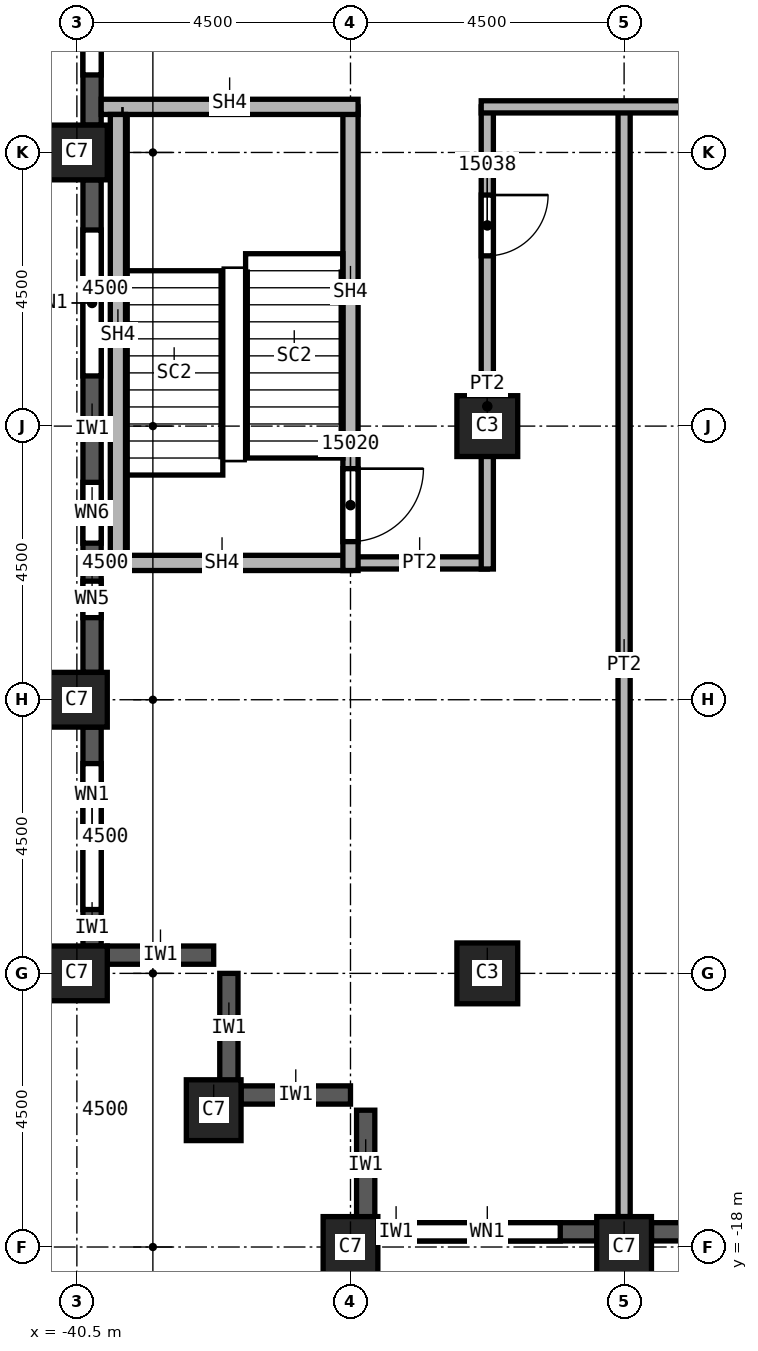
"""IFC4 building model, lengths in metres.
Left out: names, types, materials, properties, quantities, classifications, styles, units other than length and angle.
Written with IfcOpenShell. Run it as: python <this file> out.ifc"""

import sys

from ifc_helpers import new_model, si_unit, direction, frame, frame_2d, origin, origin_2d, place, context, subcontext, project, spatial, rectangle, extrude, element, fill, save


model = new_model("IFC4")
c1 = context("Model", 3, precision=1e-05, world=origin(), true_north=direction((0.0, 1.0)))
c2 = subcontext(c1, "Body", "Model", "MODEL_VIEW")
j1 = project(units=[si_unit("LENGTHUNIT", "METRE"), si_unit("PLANEANGLEUNIT", "RADIAN")], contexts=[c1])
p1 = place(None, origin())
s1 = spatial("IfcSite", under=j1, at=p1, CompositionType="ELEMENT")
p2 = place(p1, origin())
s2 = spatial("IfcBuilding", under=s1, at=p2, CompositionType="ELEMENT")
p3 = place(p2, frame((0.0, 0.0, 232.0)))
s3 = spatial("IfcBuildingStorey", under=s2, at=p3, CompositionType="ELEMENT", Elevation=232.0)
for number, where, z_axis, x_axis in (
    (1, (-40.5, 0.0, 0.0), (0.0, 0.0, 1.0), (0.0, 1.0, 0.0)),
    (2, (-40.5, -9.0, 0.0), (0.0, 0.0, 1.0), (0.0, 1.0, 0.0)),
    (3, (-40.5, -13.5, 0.0), (0.0, 0.0, 1.0), (0.0, 1.0, 0.0)),
    (4, (-38.25, -15.75, 0.0), (0.0, 0.0, 1.0), (1.0, 0.0, 0.0)),
    (5, (-31.5, -18.0, 0.0), (0.0, 0.0, 1.0), (1.0, 0.0, 0.0)),
    (6, (-36.0, -18.0, 0.0), (0.0, 0.0, 1.0), (1.0, 0.0, 0.0)),
):
    element("IfcColumn", number, at=place(p3, frame(where, z_axis=z_axis, x_axis=x_axis)), inside=s3, PredefinedType="COLUMN", context=c2, shape_type="SweptSolid", body=[
        extrude(rectangle(XDim=0.9, YDim=1.0, at=origin_2d()), origin(), (0.0, 0.0, 1.0), 3.6),
    ])
for number, where, z_axis, x_axis in (
    (7, (-33.75, -4.5, 0.0), (0.0, 0.0, 1.0), (1.0, 0.0, 0.0)),
    (8, (-33.75, -13.5, 0.0), (0.0, 0.0, 1.0), (1.0, 0.0, 0.0)),
):
    element("IfcColumn", number, at=place(p3, frame(where, z_axis=z_axis, x_axis=x_axis)), inside=s3, PredefinedType="COLUMN", context=c2, shape_type="SweptSolid", body=[
        extrude(rectangle(XDim=1.0, YDim=1.0, at=origin_2d()), origin(), (0.0, 0.0, 1.0), 3.6),
    ])
p4 = place(p3, frame((-40.0, -13.2, 0.0), z_axis=(0.0, 0.0, 1.0), x_axis=(1.0, 0.0, 0.0)))
e9 = element("IfcWall", 9, at=p4, inside=s3, PredefinedType="SOLIDWALL", context=c2, shape_type="SweptSolid", body=[
    extrude(rectangle(XDim=1.75, YDim=0.3, at=frame_2d((0.875, 0.0))), origin(), (0.0, 0.0, 1.0), 3.0),
])
for number, where, z_axis, x_axis in (
    (10, (-38.0, -15.3, 0.0), (0.0, 0.0, 1.0), (0.0, 1.0, 0.0)),
    (11, (-37.8, -15.5, 0.0), (0.0, 0.0, 1.0), (1.0, 0.0, 0.0)),
    (12, (-35.75, -17.55, 0.0), (0.0, 0.0, 1.0), (0.0, 1.0, 0.0)),
):
    element("IfcWall", number, at=place(p3, frame(where, z_axis=z_axis, x_axis=x_axis)), inside=s3, PredefinedType="SOLIDWALL", context=c2, shape_type="SweptSolid", body=[
        extrude(rectangle(XDim=1.8, YDim=0.3, at=frame_2d((0.9, 0.0))), origin(), (0.0, 0.0, 1.0), 3.0),
    ])
p5 = place(p3, frame((-40.25, 8.55, 0.0), z_axis=(0.0, 0.0, 1.0), x_axis=(0.0, -1.0, 0.0)))
e13 = element("IfcWall", 13, at=p5, inside=s3, PredefinedType="SOLIDWALL", context=c2, shape_type="SweptSolid", body=[
    extrude(rectangle(XDim=8.1, YDim=0.3, at=frame_2d((4.05, 0.0))), origin(), (0.0, 0.0, 1.0), 3.0),
])
p6 = place(p5, frame((0.825, 0.0, 0.8)))
e14 = element("IfcOpeningElement", 14, at=p6, cuts=e13, PredefinedType="OPENING", context=c2, shape_type="SweptSolid", body=[
    extrude(rectangle(XDim=2.4, YDim=1.95, at=frame_2d((1.2, 0.975))), frame((0.0, 0.15, 0.0), z_axis=(0.0, -1.0, 0.0), x_axis=(1.0, 0.0, 0.0)), (0.0, 0.0, 1.0), 0.3),
])
p7 = place(p5, frame((4.875, 0.0, 0.8)))
e15 = element("IfcOpeningElement", 15, at=p7, cuts=e13, PredefinedType="OPENING", context=c2, shape_type="SweptSolid", body=[
    extrude(rectangle(XDim=2.4, YDim=1.95, at=frame_2d((1.2, 0.975))), frame((0.0, 0.15, 0.0), z_axis=(0.0, -1.0, 0.0), x_axis=(1.0, 0.0, 0.0)), (0.0, 0.0, 1.0), 0.3),
])
p8 = place(p3, frame((-40.25, -0.45, 0.0), z_axis=(0.0, 0.0, 1.0), x_axis=(0.0, -1.0, 0.0)))
e16 = element("IfcWall", 16, at=p8, inside=s3, PredefinedType="SOLIDWALL", context=c2, shape_type="SweptSolid", body=[
    extrude(rectangle(XDim=8.1, YDim=0.3, at=frame_2d((4.05, 0.0))), origin(), (0.0, 0.0, 1.0), 3.0),
])
p9 = place(p8, frame((0.825, 0.0, 0.8)))
e17 = element("IfcOpeningElement", 17, at=p9, cuts=e16, PredefinedType="OPENING", context=c2, shape_type="SweptSolid", body=[
    extrude(rectangle(XDim=2.4, YDim=1.95, at=frame_2d((1.2, 0.975))), frame((0.0, 0.15, 0.0), z_axis=(0.0, -1.0, 0.0), x_axis=(1.0, 0.0, 0.0)), (0.0, 0.0, 1.0), 0.3),
])
p10 = place(p8, frame((4.975, 0.0, 0.8)))
e18 = element("IfcOpeningElement", 18, at=p10, cuts=e16, PredefinedType="OPENING", context=c2, shape_type="SweptSolid", body=[
    extrude(rectangle(XDim=1.0, YDim=1.95, at=frame_2d((0.5, 0.975))), frame((0.0, 0.15, 0.0), z_axis=(0.0, -1.0, 0.0), x_axis=(1.0, 0.0, 0.0)), (0.0, 0.0, 1.0), 0.3),
])
p11 = place(p8, frame((6.6, 0.0, 0.8)))
e19 = element("IfcOpeningElement", 19, at=p11, cuts=e16, PredefinedType="OPENING", context=c2, shape_type="SweptSolid", body=[
    extrude(rectangle(XDim=0.6, YDim=1.95, at=frame_2d((0.3, 0.975))), frame((0.0, 0.15, 0.0), z_axis=(0.0, -1.0, 0.0), x_axis=(1.0, 0.0, 0.0)), (0.0, 0.0, 1.0), 0.3),
])
p12 = place(p3, frame((-40.25, -9.45, 0.0), z_axis=(0.0, 0.0, 1.0), x_axis=(0.0, -1.0, 0.0)))
e20 = element("IfcWall", 20, at=p12, inside=s3, PredefinedType="SOLIDWALL", context=c2, shape_type="SweptSolid", body=[
    extrude(rectangle(XDim=3.6, YDim=0.3, at=frame_2d((1.8, 0.0))), origin(), (0.0, 0.0, 1.0), 3.0),
])
p13 = place(p12, frame((0.6, 0.0, 0.8)))
e21 = element("IfcOpeningElement", 21, at=p13, cuts=e20, PredefinedType="OPENING", context=c2, shape_type="SweptSolid", body=[
    extrude(rectangle(XDim=2.4, YDim=1.95, at=frame_2d((1.2, 0.975))), frame((0.0, 0.15, 0.0), z_axis=(0.0, -1.0, 0.0), x_axis=(1.0, 0.0, 0.0)), (0.0, 0.0, 1.0), 0.3),
])
p14 = place(p3, frame((-35.55, -17.75, 0.0), z_axis=(0.0, 0.0, 1.0), x_axis=(1.0, 0.0, 0.0)))
e22 = element("IfcWall", 22, at=p14, inside=s3, PredefinedType="SOLIDWALL", context=c2, shape_type="SweptSolid", body=[
    extrude(rectangle(XDim=3.6, YDim=0.3, at=frame_2d((1.8, 0.0))), origin(), (0.0, 0.0, 1.0), 3.0),
])
p15 = place(p14, frame((0.6, 0.0, 0.8)))
e23 = element("IfcOpeningElement", 23, at=p15, cuts=e22, PredefinedType="OPENING", context=c2, shape_type="SweptSolid", body=[
    extrude(rectangle(XDim=2.4, YDim=1.95, at=frame_2d((1.2, 0.975))), frame((0.0, 0.15, 0.0), z_axis=(0.0, -1.0, 0.0), x_axis=(1.0, 0.0, 0.0)), (0.0, 0.0, 1.0), 0.3),
])
p16 = place(p3, frame((-31.05, -17.75, 0.0), z_axis=(0.0, 0.0, 1.0), x_axis=(1.0, 0.0, 0.0)))
e24 = element("IfcWall", 24, at=p16, inside=s3, PredefinedType="SOLIDWALL", context=c2, shape_type="SweptSolid", body=[
    extrude(rectangle(XDim=3.6, YDim=0.3, at=frame_2d((1.8, 0.0))), origin(), (0.0, 0.0, 1.0), 3.0),
])
p17 = place(p16, frame((0.6, 0.0, 0.8)))
e25 = element("IfcOpeningElement", 25, at=p17, cuts=e24, PredefinedType="OPENING", context=c2, shape_type="SweptSolid", body=[
    extrude(rectangle(XDim=2.4, YDim=1.95, at=frame_2d((1.2, 0.975))), frame((0.0, 0.15, 0.0), z_axis=(0.0, -1.0, 0.0), x_axis=(1.0, 0.0, 0.0)), (0.0, 0.0, 1.0), 0.3),
])
p18 = place(p3, frame((-33.75, -6.75, 0.0), z_axis=(0.0, 0.0, 1.0), x_axis=(-1.0, 0.0, 0.0)))
e26 = element("IfcWall", 26, at=p18, inside=s3, PredefinedType="PARTITIONING", context=c2, shape_type="SweptSolid", body=[
    extrude(rectangle(XDim=2.25, YDim=0.2, at=frame_2d((1.125, 0.0))), origin(), (0.0, 0.0, 1.0), 3.6),
])
p19 = place(p3, frame((-33.75, 0.75, 0.0), z_axis=(0.0, 0.0, 1.0), x_axis=(0.0, -1.0, 0.0)))
e27 = element("IfcWall", 27, at=p19, inside=s3, PredefinedType="PARTITIONING", context=c2, shape_type="SweptSolid", body=[
    extrude(rectangle(XDim=7.6, YDim=0.2, at=frame_2d((3.8, 0.0))), origin(), (0.0, 0.0, 1.0), 3.6),
])
p20 = place(p19, frame((1.45, 0.0, 0.0)))
e28 = element("IfcOpeningElement", 28, at=p20, cuts=e27, PredefinedType="OPENING", context=c2, shape_type="SweptSolid", body=[
    extrude(rectangle(XDim=1.0, YDim=2.1, at=frame_2d((0.5, 1.05))), frame((0.0, 0.1, 0.0), z_axis=(0.0, -1.0, 0.0), x_axis=(1.0, 0.0, 0.0)), (0.0, 0.0, 1.0), 0.2),
])
p21 = place(p3, frame((-31.5, 0.75, 0.0), z_axis=(0.0, 0.0, 1.0), x_axis=(0.0, -1.0, 0.0)))
e29 = element("IfcWall", 29, at=p21, inside=s3, PredefinedType="PARTITIONING", context=c2, shape_type="SweptSolid", body=[
    extrude(rectangle(XDim=18.25, YDim=0.2, at=frame_2d((9.125, 0.0))), origin(), (0.0, 0.0, 1.0), 3.6),
])
p22 = place(p3, frame((-15.4, 0.75, 0.0), z_axis=(0.0, 0.0, 1.0), x_axis=(-1.0, 0.0, 0.0)))
e30 = element("IfcWall", 30, at=p22, inside=s3, PredefinedType="PARTITIONING", context=c2, shape_type="SweptSolid", body=[
    extrude(rectangle(XDim=18.45, YDim=0.2, at=frame_2d((9.225, 0.0))), origin(), (0.0, 0.0, 1.0), 3.6),
])
p23 = place(p22, frame((5.35, 0.0, 0.0)))
e31 = element("IfcOpeningElement", 31, at=p23, cuts=e30, PredefinedType="OPENING", context=c2, shape_type="SweptSolid", body=[
    extrude(rectangle(XDim=1.0, YDim=2.1, at=frame_2d((0.5, 1.05))), frame((0.0, 0.1, 0.0), z_axis=(0.0, -1.0, 0.0), x_axis=(1.0, 0.0, 0.0)), (0.0, 0.0, 1.0), 0.2),
])
p24 = place(p22, frame((12.35, 0.0, 0.0)))
e32 = element("IfcOpeningElement", 32, at=p24, cuts=e30, PredefinedType="OPENING", context=c2, shape_type="SweptSolid", body=[
    extrude(rectangle(XDim=1.0, YDim=2.1, at=frame_2d((0.5, 1.05))), frame((0.0, 0.1, 0.0), z_axis=(0.0, -1.0, 0.0), x_axis=(1.0, 0.0, 0.0)), (0.0, 0.0, 1.0), 0.2),
])
p25 = place(p3, frame((-36.0, -6.75, 0.0), z_axis=(0.0, 0.0, 1.0), x_axis=(-1.0, 0.0, 0.0)))
e33 = element("IfcWall", 33, at=p25, inside=s3, PredefinedType="SOLIDWALL", context=c2, shape_type="SweptSolid", body=[
    extrude(rectangle(XDim=4.1, YDim=0.25, at=frame_2d((2.05, 0.0))), origin(), (0.0, 0.0, 1.0), 3.6),
])
p26 = place(p3, frame((-36.0, 0.75, 0.0), z_axis=(0.0, 0.0, 1.0), x_axis=(0.0, -1.0, 0.0)))
e34 = element("IfcWall", 34, at=p26, inside=s3, PredefinedType="SOLIDWALL", context=c2, shape_type="SweptSolid", body=[
    extrude(rectangle(XDim=7.625, YDim=0.25, at=frame_2d((3.812, 0.0))), origin(), (0.0, 0.0, 1.0), 3.6),
])
p27 = place(p26, frame((5.95, 0.0, 0.0)))
e35 = element("IfcOpeningElement", 35, at=p27, cuts=e34, PredefinedType="OPENING", context=c2, shape_type="SweptSolid", body=[
    extrude(rectangle(XDim=1.2, YDim=2.1, at=frame_2d((0.6, 1.05))), frame((0.0, 0.125, 0.0), z_axis=(0.0, -1.0, 0.0), x_axis=(1.0, 0.0, 0.0)), (0.0, 0.0, 1.0), 0.25),
])
p28 = place(p3, frame((-35.875, 0.75, 0.0), z_axis=(0.0, 0.0, 1.0), x_axis=(-1.0, 0.0, 0.0)))
e36 = element("IfcWall", 36, at=p28, inside=s3, PredefinedType="SOLIDWALL", context=c2, shape_type="SweptSolid", body=[
    extrude(rectangle(XDim=4.225, YDim=0.25, at=frame_2d((2.113, 0.0))), origin(), (0.0, 0.0, 1.0), 3.6),
])
p29 = place(p3, frame((-39.825, -6.625, 0.0), z_axis=(0.0, 0.0, 1.0), x_axis=(0.0, 1.0, 0.0)))
e37 = element("IfcWall", 37, at=p29, inside=s3, PredefinedType="SOLIDWALL", context=c2, shape_type="SweptSolid", body=[
    extrude(rectangle(XDim=7.25, YDim=0.25, at=frame_2d((3.625, 0.0))), origin(), (0.0, 0.0, 1.0), 3.6),
])
p30 = place(p7, origin())
e38 = element("IfcWindow", 38, at=p30, inside=s3, PartitioningType="SINGLE_PANEL", PredefinedType="WINDOW", context=c2, shape_type="SweptSolid", body=[
    extrude(rectangle(XDim=2.4, YDim=1.95, at=frame_2d((1.2, 0.975))), frame((0.0, 0.03, 0.0), z_axis=(0.0, -1.0, 0.0), x_axis=(1.0, 0.0, 0.0)), (0.0, 0.0, 1.0), 0.06),
])
fill(e15, e38)
p31 = place(p9, origin())
e39 = element("IfcWindow", 39, at=p31, inside=s3, PartitioningType="SINGLE_PANEL", PredefinedType="WINDOW", context=c2, shape_type="SweptSolid", body=[
    extrude(rectangle(XDim=2.4, YDim=1.95, at=frame_2d((1.2, 0.975))), frame((0.0, 0.03, 0.0), z_axis=(0.0, -1.0, 0.0), x_axis=(1.0, 0.0, 0.0)), (0.0, 0.0, 1.0), 0.06),
])
fill(e17, e39)
p32 = place(p13, origin())
e40 = element("IfcWindow", 40, at=p32, inside=s3, PartitioningType="SINGLE_PANEL", PredefinedType="WINDOW", context=c2, shape_type="SweptSolid", body=[
    extrude(rectangle(XDim=2.4, YDim=1.95, at=frame_2d((1.2, 0.975))), frame((0.0, 0.03, 0.0), z_axis=(0.0, -1.0, 0.0), x_axis=(1.0, 0.0, 0.0)), (0.0, 0.0, 1.0), 0.06),
])
fill(e21, e40)
p33 = place(p15, origin())
e41 = element("IfcWindow", 41, at=p33, inside=s3, PartitioningType="SINGLE_PANEL", PredefinedType="WINDOW", context=c2, shape_type="SweptSolid", body=[
    extrude(rectangle(XDim=2.4, YDim=1.95, at=frame_2d((1.2, 0.975))), frame((0.0, 0.03, 0.0), z_axis=(0.0, -1.0, 0.0), x_axis=(1.0, 0.0, 0.0)), (0.0, 0.0, 1.0), 0.06),
])
fill(e23, e41)
p34 = place(p27, origin())
e42 = element("IfcDoor", 42, at=p34, inside=s3, OperationType="SINGLE_SWING_LEFT", PredefinedType="DOOR", context=c2, shape_type="SweptSolid", body=[
    extrude(rectangle(XDim=1.2, YDim=2.1, at=frame_2d((0.6, 1.05))), frame((0.0, 0.025, 0.0), z_axis=(0.0, -1.0, 0.0), x_axis=(1.0, 0.0, 0.0)), (0.0, 0.0, 1.0), 0.05),
])
fill(e35, e42)
p35 = place(p20, origin())
e43 = element("IfcDoor", 43, at=p35, inside=s3, OperationType="SINGLE_SWING_LEFT", PredefinedType="DOOR", context=c2, shape_type="SweptSolid", body=[
    extrude(rectangle(XDim=1.0, YDim=2.1, at=frame_2d((0.5, 1.05))), frame((0.0, 0.025, 0.0), z_axis=(0.0, -1.0, 0.0), x_axis=(1.0, 0.0, 0.0)), (0.0, 0.0, 1.0), 0.05),
])
fill(e28, e43)
p36 = place(p10, origin())
e44 = element("IfcWindow", 44, at=p36, inside=s3, PartitioningType="SINGLE_PANEL", PredefinedType="WINDOW", context=c2, shape_type="SweptSolid", body=[
    extrude(rectangle(XDim=1.0, YDim=1.95, at=frame_2d((0.5, 0.975))), frame((0.0, 0.03, 0.0), z_axis=(0.0, -1.0, 0.0), x_axis=(1.0, 0.0, 0.0)), (0.0, 0.0, 1.0), 0.06),
])
fill(e18, e44)
p37 = place(p11, origin())
e45 = element("IfcWindow", 45, at=p37, inside=s3, PartitioningType="SINGLE_PANEL", PredefinedType="WINDOW", context=c2, shape_type="SweptSolid", body=[
    extrude(rectangle(XDim=0.6, YDim=1.95, at=frame_2d((0.3, 0.975))), frame((0.0, 0.03, 0.0), z_axis=(0.0, -1.0, 0.0), x_axis=(1.0, 0.0, 0.0)), (0.0, 0.0, 1.0), 0.06),
])
fill(e19, e45)
save(model, sys.argv[1])
